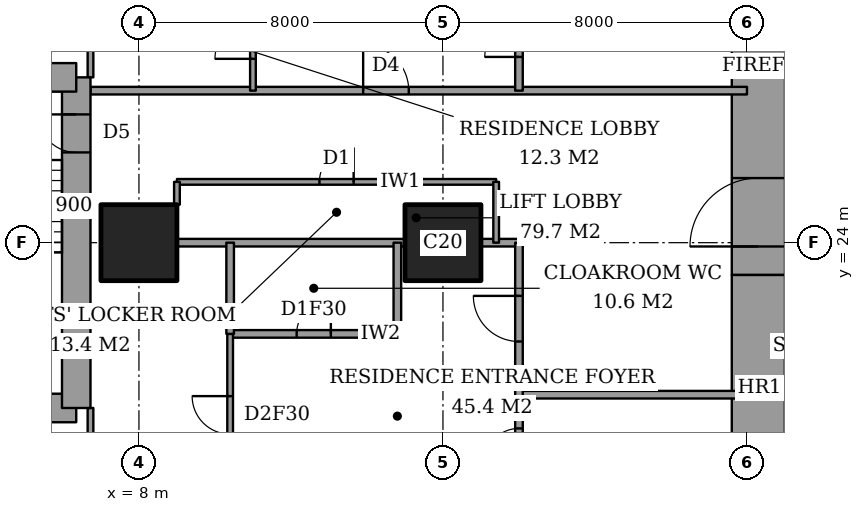
"""IFC4 building model, lengths in metres.
Left out: names, types, materials, properties, quantities, classifications, styles, units other than length and angle.
Written with IfcOpenShell. Run it as: python <this file> out.ifc"""

import sys

from ifc_helpers import new_model, si_unit, direction, frame, frame_2d, origin, origin_2d, place, context, subcontext, project, spatial, rectangle, extrude, element, fill, save


model = new_model("IFC4")
c1 = context("Model", 3, precision=1e-05, world=origin(), true_north=direction((0.0, 1.0)))
c2 = subcontext(c1, "Body", "Model", "MODEL_VIEW")
j1 = project(units=[si_unit("LENGTHUNIT", "METRE"), si_unit("PLANEANGLEUNIT", "RADIAN")], contexts=[c1])
p1 = place(None, origin())
s1 = spatial("IfcSite", under=j1, at=p1, CompositionType="ELEMENT")
p2 = place(p1, origin())
s2 = spatial("IfcBuilding", under=s1, at=p2, CompositionType="ELEMENT")
p3 = place(p2, frame((0.0, 0.0, 29.6)))
s3 = spatial("IfcBuildingStorey", under=s2, at=p3, CompositionType="ELEMENT", Elevation=29.6)
for number, where, z_axis, x_axis in (
    (1, (8.0, 24.0, 0.0), (0.0, 0.0, 1.0), (1.0, 0.0, 0.0)),
    (2, (16.0, 24.0, 0.0), (0.0, 0.0, 1.0), (1.0, 0.0, 0.0)),
):
    element("IfcColumn", number, at=place(p3, frame(where, z_axis=z_axis, x_axis=x_axis)), inside=s3, PredefinedType="COLUMN", context=c2, shape_type="SweptSolid", body=[
        extrude(rectangle(XDim=2.0, YDim=2.0, at=origin_2d()), origin(), (0.0, 0.0, 1.0), 3.6),
    ])
p4 = place(p3, frame((24.3, 13.0, 0.0), z_axis=(0.0, 0.0, 1.0), x_axis=(0.0, 1.0, 0.0)))
e3 = element("IfcWall", 3, at=p4, inside=s3, PredefinedType="SHEAR", context=c2, shape_type="SweptSolid", body=[
    extrude(rectangle(XDim=10.15, YDim=1.4, at=frame_2d((5.075, 0.0))), origin(), (0.0, 0.0, 1.0), 3.6),
])
p5 = place(p3, frame((24.3, 23.15, 0.0), z_axis=(0.0, 0.0, 1.0), x_axis=(0.0, 1.0, 0.0)))
e4 = element("IfcWall", 4, at=p5, inside=s3, PredefinedType="SHEAR", context=c2, shape_type="SweptSolid", body=[
    extrude(rectangle(XDim=11.85, YDim=1.4, at=frame_2d((5.925, 0.0))), origin(), (0.0, 0.0, 1.0), 3.6),
])
p6 = place(p5, frame((0.75, 0.0, 0.0)))
e5 = element("IfcOpeningElement", 5, at=p6, cuts=e4, PredefinedType="OPENING", context=c2, shape_type="SweptSolid", body=[
    extrude(rectangle(XDim=1.8, YDim=2.4, at=frame_2d((0.9, 1.2))), frame((0.0, 0.71, 0.0), z_axis=(0.0, -1.0, 0.0), x_axis=(1.0, 0.0, 0.0)), (0.0, 0.0, 1.0), 1.42),
])
p7 = place(p3, frame((1.9, 19.65, 0.0), z_axis=(0.0, 0.0, 1.0), x_axis=(1.0, 0.0, 0.0)))
e6 = element("IfcWall", 6, at=p7, inside=s3, PredefinedType="SHEAR", context=c2, shape_type="SweptSolid", body=[
    extrude(rectangle(XDim=4.45, YDim=0.75, at=frame_2d((2.225, 0.0))), origin(), (0.0, 0.0, 1.0), 3.6),
])
p8 = place(p3, frame((6.35, 19.65, 0.0), z_axis=(0.0, 0.0, 1.0), x_axis=(0.0, 1.0, 0.0)))
e7 = element("IfcWall", 7, at=p8, inside=s3, PredefinedType="SHEAR", context=c2, shape_type="SweptSolid", body=[
    extrude(rectangle(XDim=8.7, YDim=0.75, at=frame_2d((4.35, 0.0))), origin(), (0.0, 0.0, 1.0), 3.6),
])
p9 = place(p8, frame((6.725, 0.0, 0.0)))
e8 = element("IfcOpeningElement", 8, at=p9, cuts=e7, PredefinedType="OPENING", context=c2, shape_type="SweptSolid", body=[
    extrude(rectangle(XDim=1.0, YDim=2.1, at=frame_2d((0.5, 1.05))), frame((0.0, 0.385, 0.0), z_axis=(0.0, -1.0, 0.0), x_axis=(1.0, 0.0, 0.0)), (0.0, 0.0, 1.0), 0.77),
])
p10 = place(p3, frame((6.35, 28.35, 0.0), z_axis=(0.0, 0.0, 1.0), x_axis=(-1.0, 0.0, 0.0)))
e9 = element("IfcWall", 9, at=p10, inside=s3, PredefinedType="SHEAR", context=c2, shape_type="SweptSolid", body=[
    extrude(rectangle(XDim=4.45, YDim=0.75, at=frame_2d((2.225, 0.0))), origin(), (0.0, 0.0, 1.0), 3.6),
])
p11 = place(p3, frame((18.0, 20.0, 0.0), z_axis=(0.0, 0.0, 1.0), x_axis=(1.0, 0.0, 0.0)))
e10 = element("IfcWall", 10, at=p11, inside=s3, PredefinedType="PARTITIONING", context=c2, shape_type="SweptSolid", body=[
    extrude(rectangle(XDim=6.0, YDim=0.2, at=frame_2d((3.0, 0.0))), origin(), (0.0, 0.0, 1.0), 3.35),
])
p12 = place(p3, frame((10.4, 21.6, 0.0), z_axis=(0.0, 0.0, 1.0), x_axis=(1.0, 0.0, 0.0)))
e11 = element("IfcWall", 11, at=p12, inside=s3, PredefinedType="PARTITIONING", context=c2, shape_type="SweptSolid", body=[
    extrude(rectangle(XDim=4.4, YDim=0.2, at=frame_2d((2.2, 0.0))), origin(), (0.0, 0.0, 1.0), 3.35),
])
p13 = place(p12, frame((1.75, 0.0, 0.0)))
e12 = element("IfcOpeningElement", 12, at=p13, cuts=e11, PredefinedType="OPENING", context=c2, shape_type="SweptSolid", body=[
    extrude(rectangle(XDim=0.9, YDim=2.1, at=frame_2d((0.45, 1.05))), frame((0.0, 0.11, 0.0), z_axis=(0.0, -1.0, 0.0), x_axis=(1.0, 0.0, 0.0)), (0.0, 0.0, 1.0), 0.22),
])
p14 = place(p3, frame((9.0, 24.0, 0.0), z_axis=(0.0, 0.0, 1.0), x_axis=(1.0, 0.0, 0.0)))
e13 = element("IfcWall", 13, at=p14, inside=s3, PredefinedType="PARTITIONING", context=c2, shape_type="SweptSolid", body=[
    extrude(rectangle(XDim=6.0, YDim=0.2, at=frame_2d((3.0, 0.0))), origin(), (0.0, 0.0, 1.0), 3.35),
])
p15 = place(p3, frame((17.0, 24.0, 0.0), z_axis=(0.0, 0.0, 1.0), x_axis=(1.0, 0.0, 0.0)))
e14 = element("IfcWall", 14, at=p15, inside=s3, PredefinedType="PARTITIONING", context=c2, shape_type="SweptSolid", body=[
    extrude(rectangle(XDim=1.0, YDim=0.2, at=frame_2d((0.5, 0.0))), origin(), (0.0, 0.0, 1.0), 3.35),
])
p16 = place(p3, frame((9.0, 25.6, 0.0), z_axis=(0.0, 0.0, 1.0), x_axis=(1.0, 0.0, 0.0)))
e15 = element("IfcWall", 15, at=p16, inside=s3, PredefinedType="PARTITIONING", context=c2, shape_type="SweptSolid", body=[
    extrude(rectangle(XDim=8.4, YDim=0.15, at=frame_2d((4.2, 0.0))), origin(), (0.0, 0.0, 1.0), 3.35),
])
p17 = place(p16, frame((3.75, 0.0, 0.0)))
e16 = element("IfcOpeningElement", 16, at=p17, cuts=e15, PredefinedType="OPENING", context=c2, shape_type="SweptSolid", body=[
    extrude(rectangle(XDim=0.9, YDim=2.1, at=frame_2d((0.45, 1.05))), frame((0.0, 0.085, 0.0), z_axis=(0.0, -1.0, 0.0), x_axis=(1.0, 0.0, 0.0)), (0.0, 0.0, 1.0), 0.17),
])
p18 = place(p3, frame((6.725, 28.0, 0.0), z_axis=(0.0, 0.0, 1.0), x_axis=(1.0, 0.0, 0.0)))
e17 = element("IfcWall", 17, at=p18, inside=s3, PredefinedType="PARTITIONING", context=c2, shape_type="SweptSolid", body=[
    extrude(rectangle(XDim=17.275, YDim=0.2, at=frame_2d((8.637, 0.0))), origin(), (0.0, 0.0, 1.0), 3.35),
])
p19 = place(p18, frame((7.175, 0.0, 0.0)))
e18 = element("IfcOpeningElement", 18, at=p19, cuts=e17, PredefinedType="OPENING", context=c2, shape_type="SweptSolid", body=[
    extrude(rectangle(XDim=1.2, YDim=2.4, at=frame_2d((0.6, 1.2))), frame((0.0, 0.11, 0.0), z_axis=(0.0, -1.0, 0.0), x_axis=(1.0, 0.0, 0.0)), (0.0, 0.0, 1.0), 0.22),
])
p20 = place(p3, frame((6.725, 17.2, 0.0), z_axis=(0.0, 0.0, 1.0), x_axis=(0.0, 1.0, 0.0)))
e19 = element("IfcWall", 19, at=p20, inside=s3, PredefinedType="PARTITIONING", context=c2, shape_type="SweptSolid", body=[
    extrude(rectangle(XDim=2.45, YDim=0.15, at=frame_2d((1.225, 0.0))), origin(), (0.0, 0.0, 1.0), 3.35),
])
p21 = place(p20, frame((0.587, 0.0, 0.0)))
e20 = element("IfcOpeningElement", 20, at=p21, cuts=e19, PredefinedType="OPENING", context=c2, shape_type="SweptSolid", body=[
    extrude(rectangle(XDim=0.9, YDim=2.1, at=frame_2d((0.45, 1.05))), frame((0.0, 0.085, 0.0), z_axis=(0.0, -1.0, 0.0), x_axis=(1.0, 0.0, 0.0)), (0.0, 0.0, 1.0), 0.17),
])
p22 = place(p3, frame((6.725, 28.35, 0.0), z_axis=(0.0, 0.0, 1.0), x_axis=(0.0, 1.0, 0.0)))
e21 = element("IfcWall", 21, at=p22, inside=s3, PredefinedType="PARTITIONING", context=c2, shape_type="SweptSolid", body=[
    extrude(rectangle(XDim=2.45, YDim=0.15, at=frame_2d((1.225, 0.0))), origin(), (0.0, 0.0, 1.0), 3.35),
])
p23 = place(p22, frame((0.962, 0.0, 0.0)))
e22 = element("IfcOpeningElement", 22, at=p23, cuts=e21, PredefinedType="OPENING", context=c2, shape_type="SweptSolid", body=[
    extrude(rectangle(XDim=0.9, YDim=2.1, at=frame_2d((0.45, 1.05))), frame((0.0, 0.085, 0.0), z_axis=(0.0, -1.0, 0.0), x_axis=(1.0, 0.0, 0.0)), (0.0, 0.0, 1.0), 0.17),
])
p24 = place(p3, frame((9.0, 25.0, 0.0), z_axis=(0.0, 0.0, 1.0), x_axis=(0.0, 1.0, 0.0)))
e23 = element("IfcWall", 23, at=p24, inside=s3, PredefinedType="PARTITIONING", context=c2, shape_type="SweptSolid", body=[
    extrude(rectangle(XDim=0.6, YDim=0.15, at=frame_2d((0.3, 0.0))), origin(), (0.0, 0.0, 1.0), 3.35),
])
p25 = place(p3, frame((10.4, 21.6, 0.0), z_axis=(0.0, 0.0, 1.0), x_axis=(0.0, 1.0, 0.0)))
e24 = element("IfcWall", 24, at=p25, inside=s3, PredefinedType="PARTITIONING", context=c2, shape_type="SweptSolid", body=[
    extrude(rectangle(XDim=2.4, YDim=0.2, at=frame_2d((1.2, 0.0))), origin(), (0.0, 0.0, 1.0), 3.35),
])
p26 = place(p3, frame((10.4, 10.6, 0.0), z_axis=(0.0, 0.0, 1.0), x_axis=(0.0, 1.0, 0.0)))
e25 = element("IfcWall", 25, at=p26, inside=s3, PredefinedType="PARTITIONING", context=c2, shape_type="SweptSolid", body=[
    extrude(rectangle(XDim=11.0, YDim=0.15, at=frame_2d((5.5, 0.0))), origin(), (0.0, 0.0, 1.0), 3.35),
])
p27 = place(p26, frame((8.363, 0.0, 0.0)))
e26 = element("IfcOpeningElement", 26, at=p27, cuts=e25, PredefinedType="OPENING", context=c2, shape_type="SweptSolid", body=[
    extrude(rectangle(XDim=1.0, YDim=2.1, at=frame_2d((0.5, 1.05))), frame((0.0, 0.085, 0.0), z_axis=(0.0, -1.0, 0.0), x_axis=(1.0, 0.0, 0.0)), (0.0, 0.0, 1.0), 0.17),
])
p28 = place(p3, frame((11.0, 28.0, 0.0), z_axis=(0.0, 0.0, 1.0), x_axis=(0.0, 1.0, 0.0)))
e27 = element("IfcWall", 27, at=p28, inside=s3, PredefinedType="PARTITIONING", context=c2, shape_type="SweptSolid", body=[
    extrude(rectangle(XDim=9.0, YDim=0.15, at=frame_2d((4.5, 0.0))), origin(), (0.0, 0.0, 1.0), 3.35),
])
p29 = place(p28, frame((0.837, 0.0, 0.0)))
e28 = element("IfcOpeningElement", 28, at=p29, cuts=e27, PredefinedType="OPENING", context=c2, shape_type="SweptSolid", body=[
    extrude(rectangle(XDim=1.0, YDim=2.1, at=frame_2d((0.5, 1.05))), frame((0.0, 0.085, 0.0), z_axis=(0.0, -1.0, 0.0), x_axis=(1.0, 0.0, 0.0)), (0.0, 0.0, 1.0), 0.17),
])
p30 = place(p3, frame((14.8, 21.6, 0.0), z_axis=(0.0, 0.0, 1.0), x_axis=(0.0, 1.0, 0.0)))
e29 = element("IfcWall", 29, at=p30, inside=s3, PredefinedType="PARTITIONING", context=c2, shape_type="SweptSolid", body=[
    extrude(rectangle(XDim=2.4, YDim=0.2, at=frame_2d((1.2, 0.0))), origin(), (0.0, 0.0, 1.0), 3.35),
])
p31 = place(p3, frame((17.4, 24.0, 0.0), z_axis=(0.0, 0.0, 1.0), x_axis=(0.0, 1.0, 0.0)))
e30 = element("IfcWall", 30, at=p31, inside=s3, PredefinedType="PARTITIONING", context=c2, shape_type="SweptSolid", body=[
    extrude(rectangle(XDim=1.6, YDim=0.15, at=frame_2d((0.8, 0.0))), origin(), (0.0, 0.0, 1.0), 3.35),
])
p32 = place(p3, frame((18.0, 17.325, 0.0), z_axis=(0.0, 0.0, 1.0), x_axis=(0.0, 1.0, 0.0)))
e31 = element("IfcWall", 31, at=p32, inside=s3, PredefinedType="PARTITIONING", context=c2, shape_type="SweptSolid", body=[
    extrude(rectangle(XDim=6.675, YDim=0.2, at=frame_2d((3.337, 0.0))), origin(), (0.0, 0.0, 1.0), 3.35),
])
p33 = place(p32, frame((4.075, 0.0, 0.0)))
e32 = element("IfcOpeningElement", 32, at=p33, cuts=e31, PredefinedType="OPENING", context=c2, shape_type="SweptSolid", body=[
    extrude(rectangle(XDim=1.2, YDim=2.4, at=frame_2d((0.6, 1.2))), frame((0.0, 0.11, 0.0), z_axis=(0.0, -1.0, 0.0), x_axis=(1.0, 0.0, 0.0)), (0.0, 0.0, 1.0), 0.22),
])
p34 = place(p32, frame((0.887, 0.0, 0.0)))
e33 = element("IfcOpeningElement", 33, at=p34, cuts=e31, PredefinedType="OPENING", context=c2, shape_type="SweptSolid", body=[
    extrude(rectangle(XDim=0.9, YDim=2.1, at=frame_2d((0.45, 1.05))), frame((0.0, 0.11, 0.0), z_axis=(0.0, -1.0, 0.0), x_axis=(1.0, 0.0, 0.0)), (0.0, 0.0, 1.0), 0.22),
])
p35 = place(p3, frame((18.0, 28.0, 0.0), z_axis=(0.0, 0.0, 1.0), x_axis=(0.0, 1.0, 0.0)))
e34 = element("IfcWall", 34, at=p35, inside=s3, PredefinedType="PARTITIONING", context=c2, shape_type="SweptSolid", body=[
    extrude(rectangle(XDim=5.0, YDim=0.2, at=frame_2d((2.5, 0.0))), origin(), (0.0, 0.0, 1.0), 3.35),
])
p36 = place(p35, frame((0.887, 0.0, 0.0)))
e35 = element("IfcOpeningElement", 35, at=p36, cuts=e34, PredefinedType="OPENING", context=c2, shape_type="SweptSolid", body=[
    extrude(rectangle(XDim=0.9, YDim=2.1, at=frame_2d((0.45, 1.05))), frame((0.0, 0.11, 0.0), z_axis=(0.0, -1.0, 0.0), x_axis=(1.0, 0.0, 0.0)), (0.0, 0.0, 1.0), 0.22),
])
p37 = place(p27, origin())
e36 = element("IfcDoor", 36, at=p37, inside=s3, OperationType="SINGLE_SWING_LEFT", PredefinedType="DOOR", context=c2, shape_type="SweptSolid", body=[
    extrude(rectangle(XDim=1.0, YDim=2.1, at=frame_2d((0.5, 1.05))), frame((0.0, 0.025, 0.0), z_axis=(0.0, -1.0, 0.0), x_axis=(1.0, 0.0, 0.0)), (0.0, 0.0, 1.0), 0.05),
])
fill(e26, e36)
p38 = place(p13, origin())
e37 = element("IfcDoor", 37, at=p38, inside=s3, OperationType="SINGLE_SWING_LEFT", PredefinedType="DOOR", context=c2, shape_type="SweptSolid", body=[
    extrude(rectangle(XDim=0.9, YDim=2.1, at=frame_2d((0.45, 1.05))), frame((0.0, 0.025, 0.0), z_axis=(0.0, -1.0, 0.0), x_axis=(1.0, 0.0, 0.0)), (0.0, 0.0, 1.0), 0.05),
])
fill(e12, e37)
p39 = place(p33, origin())
e38 = element("IfcDoor", 38, at=p39, inside=s3, OperationType="SINGLE_SWING_LEFT", PredefinedType="DOOR", context=c2, shape_type="SweptSolid", body=[
    extrude(rectangle(XDim=1.2, YDim=2.4, at=frame_2d((0.6, 1.2))), frame((0.0, 0.025, 0.0), z_axis=(0.0, -1.0, 0.0), x_axis=(1.0, 0.0, 0.0)), (0.0, 0.0, 1.0), 0.05),
])
fill(e32, e38)
p40 = place(p34, origin())
e39 = element("IfcDoor", 39, at=p40, inside=s3, OperationType="SINGLE_SWING_RIGHT", PredefinedType="DOOR", context=c2, shape_type="SweptSolid", body=[
    extrude(rectangle(XDim=0.9, YDim=2.1, at=frame_2d((0.45, 1.05))), frame((0.0, 0.025, 0.0), z_axis=(0.0, -1.0, 0.0), x_axis=(1.0, 0.0, 0.0)), (0.0, 0.0, 1.0), 0.05),
])
fill(e33, e39)
p41 = place(p29, origin())
e40 = element("IfcDoor", 40, at=p41, inside=s3, OperationType="SINGLE_SWING_RIGHT", PredefinedType="DOOR", context=c2, shape_type="SweptSolid", body=[
    extrude(rectangle(XDim=1.0, YDim=2.1, at=frame_2d((0.5, 1.05))), frame((0.0, 0.025, 0.0), z_axis=(0.0, -1.0, 0.0), x_axis=(1.0, 0.0, 0.0)), (0.0, 0.0, 1.0), 0.05),
])
fill(e28, e40)
p42 = place(p19, origin())
e41 = element("IfcDoor", 41, at=p42, inside=s3, OperationType="SINGLE_SWING_RIGHT", PredefinedType="DOOR", context=c2, shape_type="SweptSolid", body=[
    extrude(rectangle(XDim=1.2, YDim=2.4, at=frame_2d((0.6, 1.2))), frame((0.0, 0.025, 0.0), z_axis=(0.0, -1.0, 0.0), x_axis=(1.0, 0.0, 0.0)), (0.0, 0.0, 1.0), 0.05),
])
fill(e18, e41)
p43 = place(p36, origin())
e42 = element("IfcDoor", 42, at=p43, inside=s3, OperationType="SINGLE_SWING_RIGHT", PredefinedType="DOOR", context=c2, shape_type="SweptSolid", body=[
    extrude(rectangle(XDim=0.9, YDim=2.1, at=frame_2d((0.45, 1.05))), frame((0.0, 0.025, 0.0), z_axis=(0.0, -1.0, 0.0), x_axis=(1.0, 0.0, 0.0)), (0.0, 0.0, 1.0), 0.05),
])
fill(e35, e42)
p44 = place(p17, origin())
e43 = element("IfcDoor", 43, at=p44, inside=s3, OperationType="SINGLE_SWING_LEFT", PredefinedType="DOOR", context=c2, shape_type="SweptSolid", body=[
    extrude(rectangle(XDim=0.9, YDim=2.1, at=frame_2d((0.45, 1.05))), frame((0.0, 0.025, 0.0), z_axis=(0.0, -1.0, 0.0), x_axis=(1.0, 0.0, 0.0)), (0.0, 0.0, 1.0), 0.05),
])
fill(e16, e43)
p45 = place(p6, origin())
e44 = element("IfcDoor", 44, at=p45, inside=s3, OperationType="DOUBLE_DOOR_DOUBLE_SWING", PredefinedType="DOOR", context=c2, shape_type="SweptSolid", body=[
    extrude(rectangle(XDim=1.8, YDim=2.4, at=frame_2d((0.9, 1.2))), frame((0.0, 0.025, 0.0), z_axis=(0.0, -1.0, 0.0), x_axis=(1.0, 0.0, 0.0)), (0.0, 0.0, 1.0), 0.05),
])
fill(e5, e44)
p46 = place(p9, origin())
e45 = element("IfcDoor", 45, at=p46, inside=s3, OperationType="SINGLE_SWING_LEFT", PredefinedType="DOOR", context=c2, shape_type="SweptSolid", body=[
    extrude(rectangle(XDim=1.0, YDim=2.1, at=frame_2d((0.5, 1.05))), frame((0.0, 0.025, 0.0), z_axis=(0.0, -1.0, 0.0), x_axis=(1.0, 0.0, 0.0)), (0.0, 0.0, 1.0), 0.05),
])
fill(e8, e45)
save(model, sys.argv[1])
